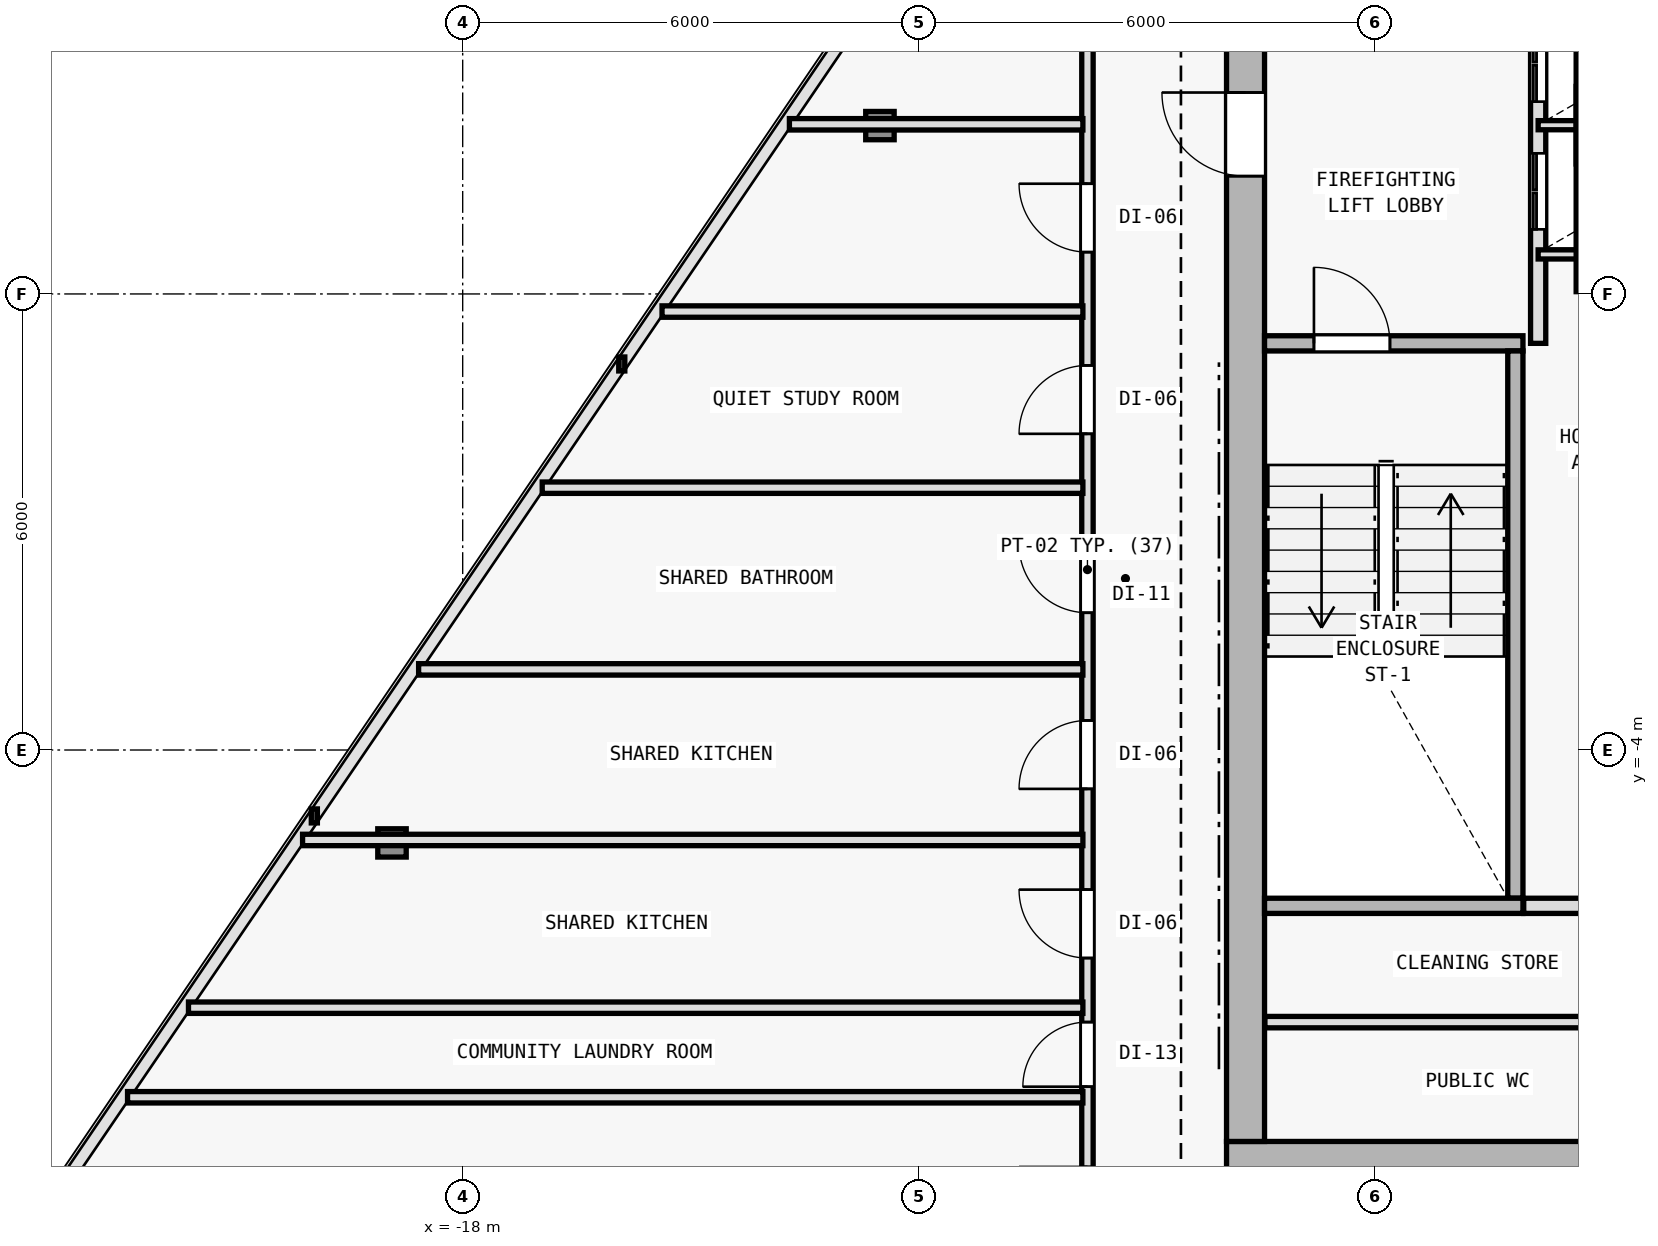
"""IFC4 building model, lengths in metres.
Left out: names, types, materials, properties, quantities, classifications, styles, units other than length and angle.
Written with IfcOpenShell. Run it as: python <this file> out.ifc"""

import sys

from ifc_helpers import new_model, si_unit, direction, frame, frame_2d, origin, origin_2d, place, context, subcontext, project, spatial, rectangle, i_section, extrude, element, fill, save


model = new_model("IFC4")
c1 = context("Model", 3, precision=1e-05, world=origin(), true_north=direction((0.0, 1.0)))
c2 = subcontext(c1, "Body", "Model", "MODEL_VIEW")
j1 = project(units=[si_unit("LENGTHUNIT", "METRE"), si_unit("PLANEANGLEUNIT", "RADIAN")], contexts=[c1])
p1 = place(None, origin())
s1 = spatial("IfcSite", under=j1, at=p1, CompositionType="ELEMENT")
p2 = place(p1, origin())
s2 = spatial("IfcBuilding", under=s1, at=p2, CompositionType="ELEMENT")
p3 = place(p2, frame((0.0, 0.0, 250.8)))
s3 = spatial("IfcBuildingStorey", under=s2, at=p3, CompositionType="ELEMENT", Elevation=250.8)
for number, where, z_axis, x_axis in (
    (1, (-7.7, -9.4, 0.0), (0.0, 0.0, 1.0), (1.0, 0.0, 0.0)),
    (2, (-7.7, 2.0, 0.0), (0.0, 0.0, 1.0), (1.0, 0.0, 0.0)),
):
    element("IfcColumn", number, at=place(p3, frame(where, z_axis=z_axis, x_axis=x_axis)), inside=s3, PredefinedType="COLUMN", context=c2, shape_type="SweptSolid", body=[
        extrude(i_section(OverallWidth=0.374, OverallDepth=0.372, WebThickness=0.012, FlangeThickness=0.02, FilletRadius=0.015, at=origin_2d()), origin(), (0.0, 0.0, 1.0), 3.6),
    ])
p4 = place(p3, frame((-12.51, 4.215, 0.005), z_axis=(0.01700241672, 0.009521353363, 0.999810112799), x_axis=(-0.488603368932, 0.87250601595, 0.0)))
e3 = element("IfcColumn", 3, at=p4, inside=s3, PredefinedType="COLUMN", context=c2, shape_type="SweptSolid", body=[
    extrude(i_section(OverallWidth=0.374, OverallDepth=0.372, WebThickness=0.012, FlangeThickness=0.02, FilletRadius=0.015, at=origin_2d()), origin(), (0.0, 0.0, 1.0), 3.59),
])
p5 = place(p3, frame((-18.93, -5.222, 0.005), z_axis=(0.025222449659, 0.021619242565, 0.999448065876), x_axis=(-0.650791373456, 0.759256602365, 0.0)))
e4 = element("IfcColumn", 4, at=p5, inside=s3, PredefinedType="COLUMN", context=c2, shape_type="SweptSolid", body=[
    extrude(i_section(OverallWidth=0.374, OverallDepth=0.372, WebThickness=0.012, FlangeThickness=0.02, FilletRadius=0.015, at=origin_2d()), origin(), (0.0, 0.0, 1.0), 3.591),
])
p6 = place(p3, frame((-7.95, -9.4, 0.0), z_axis=(0.0, 0.0, 1.0), x_axis=(1.0, 0.0, 0.0)))
e5 = element("IfcWall", 5, at=p6, inside=s3, PredefinedType="SHEAR", context=c2, shape_type="SweptSolid", body=[
    extrude(rectangle(XDim=15.9, YDim=0.5, at=frame_2d((7.95, 0.0))), origin(), (0.0, 0.0, 1.0), 3.35),
])
p7 = place(p6, frame((9.6, 0.0, 0.0)))
e6 = element("IfcOpeningElement", 6, at=p7, cuts=e5, PredefinedType="OPENING", context=c2, shape_type="SweptSolid", body=[
    extrude(rectangle(XDim=1.5, YDim=2.2, at=frame_2d((0.75, 1.1))), frame((0.0, 0.26, 0.0), z_axis=(0.0, -1.0, 0.0), x_axis=(1.0, 0.0, 0.0)), (0.0, 0.0, 1.0), 0.52),
])
p8 = place(p3, frame((-7.7, -9.15, 0.0), z_axis=(0.0, 0.0, 1.0), x_axis=(0.0, 1.0, 0.0)))
e7 = element("IfcWall", 7, at=p8, inside=s3, PredefinedType="SHEAR", context=c2, shape_type="SweptSolid", body=[
    extrude(rectangle(XDim=19.1, YDim=0.5, at=frame_2d((9.55, 0.0))), origin(), (0.0, 0.0, 1.0), 3.35),
])
p9 = place(p8, frame((12.7, 0.0, 0.0)))
e8 = element("IfcOpeningElement", 8, at=p9, cuts=e7, PredefinedType="OPENING", context=c2, shape_type="SweptSolid", body=[
    extrude(rectangle(XDim=1.1, YDim=2.15, at=frame_2d((0.55, 1.075))), frame((0.0, 0.26, 0.0), z_axis=(0.0, -1.0, 0.0), x_axis=(1.0, 0.0, 0.0)), (0.0, 0.0, 1.0), 0.52),
])
p10 = place(p3, frame((-7.45, 1.35, 0.0), z_axis=(0.0, 0.0, 1.0), x_axis=(1.0, 0.0, 0.0)))
e9 = element("IfcWall", 9, at=p10, inside=s3, PredefinedType="SOLIDWALL", context=c2, shape_type="SweptSolid", body=[
    extrude(rectangle(XDim=3.4, YDim=0.2, at=frame_2d((1.7, 0.0))), origin(), (0.0, 0.0, 1.0), 3.35),
])
p11 = place(p10, frame((0.65, 0.0, 0.0)))
e10 = element("IfcOpeningElement", 10, at=p11, cuts=e9, PredefinedType="OPENING", context=c2, shape_type="SweptSolid", body=[
    extrude(rectangle(XDim=1.0, YDim=2.15, at=frame_2d((0.5, 1.075))), frame((0.0, 0.11, 0.0), z_axis=(0.0, -1.0, 0.0), x_axis=(1.0, 0.0, 0.0)), (0.0, 0.0, 1.0), 0.22),
])
p12 = place(p3, frame((-4.15, -5.95, 0.0), z_axis=(0.0, 0.0, 1.0), x_axis=(0.0, 1.0, 0.0)))
e11 = element("IfcWall", 11, at=p12, inside=s3, PredefinedType="SOLIDWALL", context=c2, shape_type="SweptSolid", body=[
    extrude(rectangle(XDim=7.2, YDim=0.2, at=frame_2d((3.6, 0.0))), origin(), (0.0, 0.0, 1.0), 3.35),
])
p13 = place(p3, frame((-3.85, 1.35, 0.0), z_axis=(0.0, 0.0, 1.0), x_axis=(0.0, 1.0, 0.0)))
e12 = element("IfcWall", 12, at=p13, inside=s3, PredefinedType="SOLIDWALL", context=c2, shape_type="SweptSolid", body=[
    extrude(rectangle(XDim=8.595, YDim=0.2, at=frame_2d((4.297, 0.0))), origin(), (0.0, 0.0, 1.0), 3.35),
])
p14 = place(p13, frame((1.5, 0.0, 0.0)))
e13 = element("IfcOpeningElement", 13, at=p14, cuts=e12, PredefinedType="OPENING", context=c2, shape_type="SweptSolid", body=[
    extrude(rectangle(XDim=1.0, YDim=2.15, at=frame_2d((0.5, 1.075))), frame((0.0, 0.11, 0.0), z_axis=(0.0, -1.0, 0.0), x_axis=(1.0, 0.0, 0.0)), (0.0, 0.0, 1.0), 0.22),
])
p15 = place(p13, frame((3.18, 0.0, 0.0)))
e14 = element("IfcOpeningElement", 14, at=p15, cuts=e12, PredefinedType="OPENING", context=c2, shape_type="SweptSolid", body=[
    extrude(rectangle(XDim=1.0, YDim=2.15, at=frame_2d((0.5, 1.075))), frame((0.0, 0.11, 0.0), z_axis=(0.0, -1.0, 0.0), x_axis=(1.0, 0.0, 0.0)), (0.0, 0.0, 1.0), 0.22),
])
for number, where, z_axis, x_axis in (
    (15, (-3.85, 2.52, 0.0), (0.0, 0.0, 1.0), (1.0, 0.0, 0.0)),
    (16, (-3.85, 4.22, 0.0), (0.0, 0.0, 1.0), (1.0, 0.0, 0.0)),
):
    element("IfcWall", number, at=place(p3, frame(where, z_axis=z_axis, x_axis=x_axis)), inside=s3, PredefinedType="PARTITIONING", context=c2, shape_type="SweptSolid", body=[
        extrude(rectangle(XDim=2.9, YDim=0.12, at=frame_2d((1.45, 0.0))), origin(), (0.0, 0.0, 1.0), 3.35),
    ])
p16 = place(p3, frame((-7.45, -6.05, 0.0), z_axis=(0.0, 0.0, 1.0), x_axis=(1.0, 0.0, 0.0)))
e17 = element("IfcWall", 17, at=p16, inside=s3, PredefinedType="SOLIDWALL", context=c2, shape_type="SweptSolid", body=[
    extrude(rectangle(XDim=3.4, YDim=0.2, at=frame_2d((1.7, 0.0))), origin(), (0.0, 0.0, 1.0), 3.35),
])
p17 = place(p3, frame((-4.04, -6.05, 0.0), z_axis=(0.0, 0.0, 1.0), x_axis=(1.0, 0.0, 0.0)))
e18 = element("IfcWall", 18, at=p17, inside=s3, PredefinedType="SOLIDWALL", context=c2, shape_type="SweptSolid", body=[
    extrude(rectangle(XDim=2.79, YDim=0.2, at=frame_2d((1.395, 0.0))), origin(), (0.0, 0.0, 1.0), 3.35),
])
p18 = place(p3, frame((-7.445, -7.58, 0.0), z_axis=(0.0, 0.0, 1.0), x_axis=(1.0, 0.0, 0.0)))
e19 = element("IfcWall", 19, at=p18, inside=s3, PredefinedType="PARTITIONING", context=c2, shape_type="SweptSolid", body=[
    extrude(rectangle(XDim=6.195, YDim=0.15, at=frame_2d((3.098, 0.0))), origin(), (0.0, 0.0, 1.0), 3.35),
])
p19 = place(p3, frame((-9.78, -11.48, 0.0), z_axis=(0.0, 0.0, 1.0), x_axis=(0.0, 1.0, 0.0)))
e20 = element("IfcWall", 20, at=p19, inside=s3, PredefinedType="PARTITIONING", context=c2, shape_type="SweptSolid", body=[
    extrude(rectangle(XDim=19.706, YDim=0.15, at=frame_2d((9.853, 0.0))), origin(), (0.0, 0.0, 1.0), 2.875),
])
p20 = place(p19, frame((9.286, 0.0, 0.0)))
e21 = element("IfcOpeningElement", 21, at=p20, cuts=e20, PredefinedType="OPENING", context=c2, shape_type="SweptSolid", body=[
    extrude(rectangle(XDim=0.9, YDim=2.1, at=frame_2d((0.45, 1.05))), frame((0.0, 0.085, 0.0), z_axis=(0.0, -1.0, 0.0), x_axis=(1.0, 0.0, 0.0)), (0.0, 0.0, 1.0), 0.17),
])
p21 = place(p19, frame((6.969, 0.0, 0.0)))
e22 = element("IfcOpeningElement", 22, at=p21, cuts=e20, PredefinedType="OPENING", context=c2, shape_type="SweptSolid", body=[
    extrude(rectangle(XDim=0.9, YDim=2.1, at=frame_2d((0.45, 1.05))), frame((0.0, 0.085, 0.0), z_axis=(0.0, -1.0, 0.0), x_axis=(1.0, 0.0, 0.0)), (0.0, 0.0, 1.0), 0.17),
])
p22 = place(p19, frame((4.743, 0.0, 0.0)))
e23 = element("IfcOpeningElement", 23, at=p22, cuts=e20, PredefinedType="OPENING", context=c2, shape_type="SweptSolid", body=[
    extrude(rectangle(XDim=0.9, YDim=2.1, at=frame_2d((0.45, 1.05))), frame((0.0, 0.085, 0.0), z_axis=(0.0, -1.0, 0.0), x_axis=(1.0, 0.0, 0.0)), (0.0, 0.0, 1.0), 0.17),
])
p23 = place(p19, frame((3.051, 0.0, 0.0)))
e24 = element("IfcOpeningElement", 24, at=p23, cuts=e20, PredefinedType="OPENING", context=c2, shape_type="SweptSolid", body=[
    extrude(rectangle(XDim=0.85, YDim=2.1, at=frame_2d((0.425, 1.05))), frame((0.0, 0.085, 0.0), z_axis=(0.0, -1.0, 0.0), x_axis=(1.0, 0.0, 0.0)), (0.0, 0.0, 1.0), 0.17),
])
p24 = place(p19, frame((1.095, 0.0, 0.0)))
e25 = element("IfcOpeningElement", 25, at=p24, cuts=e20, PredefinedType="OPENING", context=c2, shape_type="SweptSolid", body=[
    extrude(rectangle(XDim=0.9, YDim=2.1, at=frame_2d((0.45, 1.05))), frame((0.0, 0.085, 0.0), z_axis=(0.0, -1.0, 0.0), x_axis=(1.0, 0.0, 0.0)), (0.0, 0.0, 1.0), 0.17),
])
p25 = place(p19, frame((14.03, 0.0, 0.0)))
e26 = element("IfcOpeningElement", 26, at=p25, cuts=e20, PredefinedType="OPENING", context=c2, shape_type="SweptSolid", body=[
    extrude(rectangle(XDim=0.9, YDim=2.1, at=frame_2d((0.45, 1.05))), frame((0.0, 0.085, 0.0), z_axis=(0.0, -1.0, 0.0), x_axis=(1.0, 0.0, 0.0)), (0.0, 0.0, 1.0), 0.17),
])
p26 = place(p19, frame((11.64, 0.0, 0.0)))
e27 = element("IfcOpeningElement", 27, at=p26, cuts=e20, PredefinedType="OPENING", context=c2, shape_type="SweptSolid", body=[
    extrude(rectangle(XDim=0.9, YDim=2.1, at=frame_2d((0.45, 1.05))), frame((0.0, 0.085, 0.0), z_axis=(0.0, -1.0, 0.0), x_axis=(1.0, 0.0, 0.0)), (0.0, 0.0, 1.0), 0.17),
])
p27 = place(p3, frame((-9.84, 4.232, 0.0), z_axis=(0.0, 0.0, 1.0), x_axis=(-1.0, 0.0, 0.0)))
e28 = element("IfcWall", 28, at=p27, inside=s3, PredefinedType="PARTITIONING", context=c2, shape_type="SweptSolid", body=[
    extrude(rectangle(XDim=3.861, YDim=0.15, at=frame_2d((1.931, 0.0))), origin(), (0.0, 0.0, 1.0), 2.875),
])
p28 = place(p3, frame((-9.84, -5.184, 0.0), z_axis=(0.0, 0.0, 1.0), x_axis=(-1.0, 0.0, 0.0)))
e29 = element("IfcWall", 29, at=p28, inside=s3, PredefinedType="PARTITIONING", context=c2, shape_type="SweptSolid", body=[
    extrude(rectangle(XDim=10.267, YDim=0.15, at=frame_2d((5.133, 0.0))), origin(), (0.0, 0.0, 1.0), 2.875),
])
p29 = place(p3, frame((-9.84, -0.549, 0.0), z_axis=(0.0, 0.0, 1.0), x_axis=(-1.0, 0.0, 0.0)))
e30 = element("IfcWall", 30, at=p29, inside=s3, PredefinedType="PARTITIONING", context=c2, shape_type="SweptSolid", body=[
    extrude(rectangle(XDim=7.114, YDim=0.15, at=frame_2d((3.557, 0.0))), origin(), (0.0, 0.0, 1.0), 2.925),
])
p30 = place(p3, frame((-9.84, -8.569, 0.0), z_axis=(0.0, 0.0, 1.0), x_axis=(-1.0, 0.0, 0.0)))
e31 = element("IfcWall", 31, at=p30, inside=s3, PredefinedType="PARTITIONING", context=c2, shape_type="SweptSolid", body=[
    extrude(rectangle(XDim=12.569, YDim=0.15, at=frame_2d((6.285, 0.0))), origin(), (0.0, 0.0, 1.0), 2.875),
])
p31 = place(p3, frame((-9.84, -2.939, 0.0), z_axis=(0.0, 0.0, 1.0), x_axis=(-1.0, 0.0, 0.0)))
e32 = element("IfcWall", 32, at=p31, inside=s3, PredefinedType="PARTITIONING", context=c2, shape_type="SweptSolid", body=[
    extrude(rectangle(XDim=8.74, YDim=0.15, at=frame_2d((4.37, 0.0))), origin(), (0.0, 0.0, 1.0), 2.925),
])
p32 = place(p3, frame((-9.84, -7.39, 0.0), z_axis=(0.0, 0.0, 1.0), x_axis=(-1.0, 0.0, 0.0)))
e33 = element("IfcWall", 33, at=p32, inside=s3, PredefinedType="PARTITIONING", context=c2, shape_type="SweptSolid", body=[
    extrude(rectangle(XDim=11.768, YDim=0.15, at=frame_2d((5.884, 0.0))), origin(), (0.0, 0.0, 1.0), 2.875),
])
p33 = place(p3, frame((-9.84, 1.768, 0.0), z_axis=(0.0, 0.0, 1.0), x_axis=(-1.0, 0.0, 0.0)))
e34 = element("IfcWall", 34, at=p33, inside=s3, PredefinedType="PARTITIONING", context=c2, shape_type="SweptSolid", body=[
    extrude(rectangle(XDim=5.537, YDim=0.15, at=frame_2d((2.769, 0.0))), origin(), (0.0, 0.0, 1.0), 2.925),
])
p34 = place(p9, origin())
e35 = element("IfcDoor", 35, at=p34, inside=s3, OperationType="SINGLE_SWING_RIGHT", PredefinedType="DOOR", context=c2, shape_type="SweptSolid", body=[
    extrude(rectangle(XDim=1.1, YDim=2.15, at=frame_2d((0.55, 1.075))), frame((0.0, 0.025, 0.0), z_axis=(0.0, -1.0, 0.0), x_axis=(1.0, 0.0, 0.0)), (0.0, 0.0, 1.0), 0.05),
])
fill(e8, e35)
p35 = place(p11, origin())
e36 = element("IfcDoor", 36, at=p35, inside=s3, OperationType="SINGLE_SWING_LEFT", PredefinedType="DOOR", context=c2, shape_type="SweptSolid", body=[
    extrude(rectangle(XDim=1.0, YDim=2.15, at=frame_2d((0.5, 1.075))), frame((0.0, 0.025, 0.0), z_axis=(0.0, -1.0, 0.0), x_axis=(1.0, 0.0, 0.0)), (0.0, 0.0, 1.0), 0.05),
])
fill(e10, e36)
p36 = place(p14, origin())
e37 = element("IfcDoor", 37, at=p36, inside=s3, OperationType="DOUBLE_DOOR_SLIDING", PredefinedType="DOOR", context=c2, shape_type="SweptSolid", body=[
    extrude(rectangle(XDim=1.0, YDim=2.15, at=frame_2d((0.5, 1.075))), frame((0.0, 0.025, 0.0), z_axis=(0.0, -1.0, 0.0), x_axis=(1.0, 0.0, 0.0)), (0.0, 0.0, 1.0), 0.05),
])
fill(e13, e37)
p37 = place(p15, origin())
e38 = element("IfcDoor", 38, at=p37, inside=s3, OperationType="DOUBLE_DOOR_SLIDING", PredefinedType="DOOR", context=c2, shape_type="SweptSolid", body=[
    extrude(rectangle(XDim=1.0, YDim=2.15, at=frame_2d((0.5, 1.075))), frame((0.0, 0.025, 0.0), z_axis=(0.0, -1.0, 0.0), x_axis=(1.0, 0.0, 0.0)), (0.0, 0.0, 1.0), 0.05),
])
fill(e14, e38)
p38 = place(p20, origin())
e39 = element("IfcDoor", 39, at=p38, inside=s3, OperationType="SINGLE_SWING_RIGHT", PredefinedType="DOOR", context=c2, shape_type="SweptSolid", body=[
    extrude(rectangle(XDim=0.9, YDim=2.1, at=frame_2d((0.45, 1.05))), frame((0.0, 0.025, 0.0), z_axis=(0.0, -1.0, 0.0), x_axis=(1.0, 0.0, 0.0)), (0.0, 0.0, 1.0), 0.05),
])
fill(e21, e39)
p39 = place(p21, origin())
e40 = element("IfcDoor", 40, at=p39, inside=s3, OperationType="SINGLE_SWING_LEFT", PredefinedType="DOOR", context=c2, shape_type="SweptSolid", body=[
    extrude(rectangle(XDim=0.9, YDim=2.1, at=frame_2d((0.45, 1.05))), frame((0.0, 0.025, 0.0), z_axis=(0.0, -1.0, 0.0), x_axis=(1.0, 0.0, 0.0)), (0.0, 0.0, 1.0), 0.05),
])
fill(e22, e40)
p40 = place(p22, origin())
e41 = element("IfcDoor", 41, at=p40, inside=s3, OperationType="SINGLE_SWING_RIGHT", PredefinedType="DOOR", context=c2, shape_type="SweptSolid", body=[
    extrude(rectangle(XDim=0.9, YDim=2.1, at=frame_2d((0.45, 1.05))), frame((0.0, 0.025, 0.0), z_axis=(0.0, -1.0, 0.0), x_axis=(1.0, 0.0, 0.0)), (0.0, 0.0, 1.0), 0.05),
])
fill(e23, e41)
p41 = place(p23, origin())
e42 = element("IfcDoor", 42, at=p41, inside=s3, OperationType="SINGLE_SWING_LEFT", PredefinedType="DOOR", context=c2, shape_type="SweptSolid", body=[
    extrude(rectangle(XDim=0.85, YDim=2.1, at=frame_2d((0.425, 1.05))), frame((0.0, 0.025, 0.0), z_axis=(0.0, -1.0, 0.0), x_axis=(1.0, 0.0, 0.0)), (0.0, 0.0, 1.0), 0.05),
])
fill(e24, e42)
p42 = place(p25, origin())
e43 = element("IfcDoor", 43, at=p42, inside=s3, OperationType="SINGLE_SWING_RIGHT", PredefinedType="DOOR", context=c2, shape_type="SweptSolid", body=[
    extrude(rectangle(XDim=0.9, YDim=2.1, at=frame_2d((0.45, 1.05))), frame((0.0, 0.025, 0.0), z_axis=(0.0, -1.0, 0.0), x_axis=(1.0, 0.0, 0.0)), (0.0, 0.0, 1.0), 0.05),
])
fill(e26, e43)
p43 = place(p26, origin())
e44 = element("IfcDoor", 44, at=p43, inside=s3, OperationType="SINGLE_SWING_LEFT", PredefinedType="DOOR", context=c2, shape_type="SweptSolid", body=[
    extrude(rectangle(XDim=0.9, YDim=2.1, at=frame_2d((0.45, 1.05))), frame((0.0, 0.025, 0.0), z_axis=(0.0, -1.0, 0.0), x_axis=(1.0, 0.0, 0.0)), (0.0, 0.0, 1.0), 0.05),
])
fill(e27, e44)
save(model, sys.argv[1])
